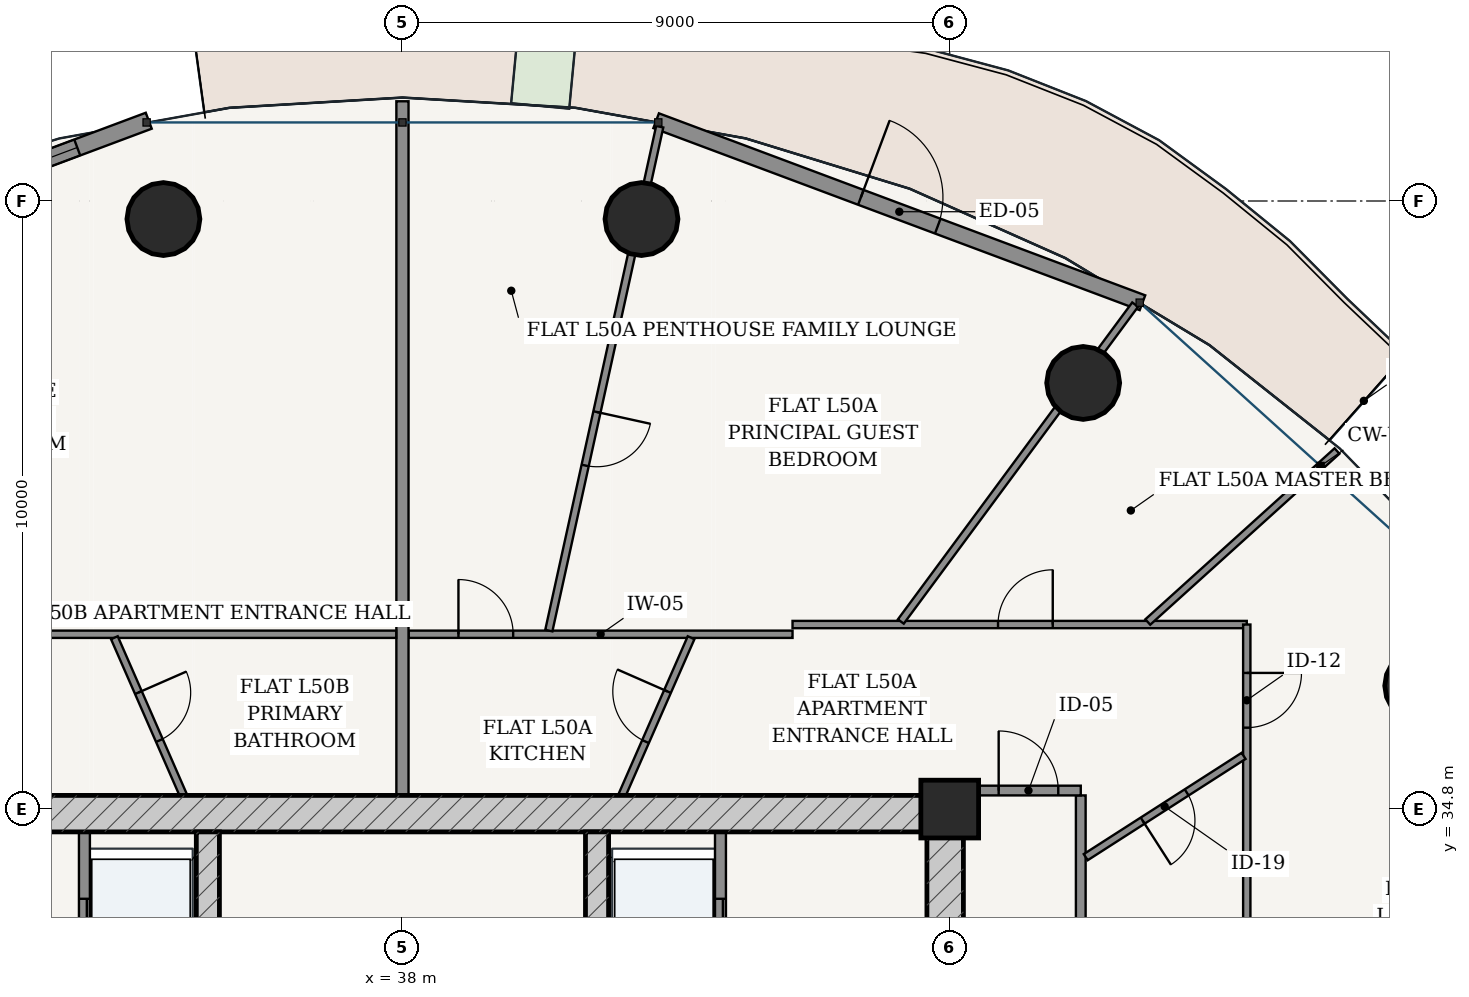
"""IFC4 building model, lengths in metres.
Left out: names, types, materials, properties, quantities, classifications, styles, units other than length and angle.
Written with IfcOpenShell. Run it as: python <this file> out.ifc"""

import sys

from ifc_helpers import new_model, si_unit, direction, frame, frame_2d, origin, origin_2d, place, context, subcontext, project, spatial, rectangle, hollow_circle, extrude, source, transform, mapped, element, fill, save


model = new_model("IFC4")
c1 = context("Model", 3, precision=1e-05, world=origin(), true_north=direction((-0.2419218956, 0.970295726276)))
c2 = subcontext(c1, "Body", "Model", "MODEL_VIEW")
j1 = project(units=[si_unit("LENGTHUNIT", "METRE"), si_unit("PLANEANGLEUNIT", "RADIAN")], contexts=[c1])
p1 = place(None, origin())
s1 = spatial("IfcSite", under=j1, at=p1, CompositionType="ELEMENT")
p2 = place(p1, origin())
s2 = spatial("IfcBuilding", under=s1, at=p2, CompositionType="ELEMENT")
p3 = place(p2, frame((0.0, 0.0, 191.2)))
s3 = spatial("IfcBuildingStorey", under=s2, at=p3, CompositionType="ELEMENT", Elevation=191.2)
p4 = place(p3, frame((47.0, 34.8, 0.0), z_axis=(0.0, 0.0, 1.0), x_axis=(1.0, 0.0, 0.0)))
e1 = element("IfcColumn", 1, at=p4, inside=s3, PredefinedType="COLUMN", context=c2, shape_type="SweptSolid", body=[
    extrude(rectangle(XDim=0.95, YDim=0.95, at=origin_2d()), origin(), (0.0, 0.0, 1.0), 3.7),
])
p5 = place(p3, frame((28.775, 34.725, 0.0), z_axis=(0.0, 0.0, 1.0), x_axis=(1.0, 0.0, 0.0)))
e2 = element("IfcWall", 2, at=p5, inside=s3, PredefinedType="SHEAR", context=c2, shape_type="SweptSolid", body=[
    extrude(rectangle(XDim=18.45, YDim=0.6, at=frame_2d((9.225, 0.0))), origin(), (0.0, 0.0, 1.0), 3.435),
])
p6 = place(p3, frame((46.925, 19.175, 0.0), z_axis=(0.0, 0.0, 1.0), x_axis=(0.0, 1.0, 0.0)))
e3 = element("IfcWall", 3, at=p6, inside=s3, PredefinedType="SHEAR", context=c2, shape_type="SweptSolid", body=[
    extrude(rectangle(XDim=15.25, YDim=0.6, at=frame_2d((7.625, 0.0))), origin(), (0.0, 0.0, 1.0), 3.435),
])
p7 = place(p6, frame((9.875, 0.0, 0.0)))
e4 = element("IfcOpeningElement", 4, at=p7, cuts=e3, PredefinedType="OPENING", context=c2, shape_type="SweptSolid", body=[
    extrude(rectangle(XDim=1.5, YDim=2.2, at=frame_2d((0.75, 1.1))), frame((0.0, 0.31, 0.0), z_axis=(0.0, -1.0, 0.0), x_axis=(1.0, 0.0, 0.0)), (0.0, 0.0, 1.0), 0.62),
])
p8 = place(p3, frame((34.8, 19.175, 0.0), z_axis=(0.0, 0.0, 1.0), x_axis=(0.0, 1.0, 0.0)))
e5 = element("IfcWall", 5, at=p8, inside=s3, PredefinedType="SHEAR", context=c2, shape_type="SweptSolid", body=[
    extrude(rectangle(XDim=15.25, YDim=0.38, at=frame_2d((7.625, 0.0))), origin(), (0.0, 0.0, 1.0), 3.435),
])
p9 = place(p8, frame((7.8, 0.0, 0.0)))
e6 = element("IfcOpeningElement", 6, at=p9, cuts=e5, PredefinedType="OPENING", context=c2, shape_type="SweptSolid", body=[
    extrude(rectangle(XDim=1.05, YDim=2.15, at=frame_2d((0.525, 1.075))), frame((0.0, 0.2, 0.0), z_axis=(0.0, -1.0, 0.0), x_axis=(1.0, 0.0, 0.0)), (0.0, 0.0, 1.0), 0.4),
])
p10 = place(p3, frame((41.2, 19.175, 0.0), z_axis=(0.0, 0.0, 1.0), x_axis=(0.0, 1.0, 0.0)))
e7 = element("IfcWall", 7, at=p10, inside=s3, PredefinedType="SHEAR", context=c2, shape_type="SweptSolid", body=[
    extrude(rectangle(XDim=15.25, YDim=0.38, at=frame_2d((7.625, 0.0))), origin(), (0.0, 0.0, 1.0), 3.435),
])
p11 = place(p10, frame((7.8, 0.0, 0.0)))
e8 = element("IfcOpeningElement", 8, at=p11, cuts=e7, PredefinedType="OPENING", context=c2, shape_type="SweptSolid", body=[
    extrude(rectangle(XDim=1.05, YDim=2.15, at=frame_2d((0.525, 1.075))), frame((0.0, 0.2, 0.0), z_axis=(0.0, -1.0, 0.0), x_axis=(1.0, 0.0, 0.0)), (0.0, 0.0, 1.0), 0.4),
])
for number, where, z_axis, x_axis in (
    (9, (54.754, 36.828, 0.0), (0.0, 0.0, 1.0), (1.0, 0.0, 0.0)),
    (10, (49.195, 41.808, 0.0), (0.0, 0.0, 1.0), (1.0, 0.0, 0.0)),
    (11, (41.931, 44.503, 0.0), (0.0, 0.0, 1.0), (1.0, 0.0, 0.0)),
    (12, (34.069, 44.503, 0.0), (0.0, 0.0, 1.0), (1.0, 0.0, 0.0)),
):
    element("IfcColumn", number, at=place(p3, frame(where, z_axis=z_axis, x_axis=x_axis)), inside=s3, PredefinedType="COLUMN", context=c2, shape_type="SweptSolid", body=[
        extrude(hollow_circle(Radius=0.6, WallThickness=0.038, at=origin_2d()), origin(), (0.0, 0.0, 1.0), 3.7),
    ])
p12 = place(p3, frame((50.17, 43.127, 0.0), z_axis=(0.0, 0.0, 1.0), x_axis=(-0.936556918375, 0.350515532672, 0.0)))
e13 = element("IfcWall", 13, at=p12, inside=s3, PredefinedType="SOLIDWALL", context=c2, shape_type="SweptSolid", body=[
    extrude(rectangle(XDim=8.539, YDim=0.26, at=frame_2d((4.27, 0.0))), origin(), (0.0, 0.0, 1.0), 3.435),
])
p13 = place(p12, frame((3.594, 0.0, 0.0)))
e14 = element("IfcOpeningElement", 14, at=p13, cuts=e13, PredefinedType="OPENING", context=c2, shape_type="SweptSolid", body=[
    extrude(rectangle(XDim=1.35, YDim=2.2, at=frame_2d((0.675, 1.1))), frame((0.0, 0.14, 0.0), z_axis=(0.0, -1.0, 0.0), x_axis=(1.0, 0.0, 0.0)), (0.0, 0.0, 1.0), 0.28),
])
p14 = place(p3, frame((33.828, 46.12, 0.0), z_axis=(0.0, 0.0, 1.0), x_axis=(-0.936556918375, -0.350515532672, 0.0)))
e15 = element("IfcWall", 15, at=p14, inside=s3, PredefinedType="SOLIDWALL", context=c2, shape_type="SweptSolid", body=[
    extrude(rectangle(XDim=8.539, YDim=0.28, at=frame_2d((4.27, 0.0))), origin(), (0.0, 0.0, 1.0), 3.435),
])
p15 = place(p14, frame((1.256, 0.0, 0.85)))
e16 = element("IfcOpeningElement", 16, at=p15, cuts=e15, PredefinedType="OPENING", context=c2, shape_type="SweptSolid", body=[
    extrude(rectangle(XDim=2.1, YDim=1.95, at=frame_2d((1.05, 0.975))), frame((0.0, 0.15, 0.0), z_axis=(0.0, -1.0, 0.0), x_axis=(1.0, 0.0, 0.0)), (0.0, 0.0, 1.0), 0.3),
])
p16 = place(p14, frame((5.184, 0.0, 0.85)))
e17 = element("IfcOpeningElement", 17, at=p16, cuts=e15, PredefinedType="OPENING", context=c2, shape_type="SweptSolid", body=[
    extrude(rectangle(XDim=2.1, YDim=1.95, at=frame_2d((1.05, 0.975))), frame((0.0, 0.15, 0.0), z_axis=(0.0, -1.0, 0.0), x_axis=(1.0, 0.0, 0.0)), (0.0, 0.0, 1.0), 0.3),
])
p17 = place(p3, frame((32.77, 28.52, 0.0), z_axis=(0.0, 0.0, 1.0), x_axis=(0.0, 1.0, 0.0)))
e18 = element("IfcWall", 18, at=p17, inside=s3, PredefinedType="PARTITIONING", context=c2, shape_type="SweptSolid", body=[
    extrude(rectangle(XDim=5.905, YDim=0.18, at=frame_2d((2.953, 0.0))), origin(), (0.0, 0.0, 1.0), 3.435),
])
p18 = place(p17, frame((3.655, 0.0, 0.0)))
e19 = element("IfcOpeningElement", 19, at=p18, cuts=e18, PredefinedType="OPENING", context=c2, shape_type="SweptSolid", body=[
    extrude(rectangle(XDim=1.15, YDim=2.2, at=frame_2d((0.575, 1.1))), frame((0.0, 0.1, 0.0), z_axis=(0.0, -1.0, 0.0), x_axis=(1.0, 0.0, 0.0)), (0.0, 0.0, 1.0), 0.2),
])
p19 = place(p17, frame((0.73, 0.0, 0.0)))
e20 = element("IfcOpeningElement", 20, at=p19, cuts=e18, PredefinedType="OPENING", context=c2, shape_type="SweptSolid", body=[
    extrude(rectangle(XDim=1.2, YDim=2.25, at=frame_2d((0.6, 1.125))), frame((0.0, 0.1, 0.0), z_axis=(0.0, -1.0, 0.0), x_axis=(1.0, 0.0, 0.0)), (0.0, 0.0, 1.0), 0.2),
])
p20 = place(p3, frame((43.23, 28.52, 0.0), z_axis=(0.0, 0.0, 1.0), x_axis=(0.0, 1.0, 0.0)))
e21 = element("IfcWall", 21, at=p20, inside=s3, PredefinedType="PARTITIONING", context=c2, shape_type="SweptSolid", body=[
    extrude(rectangle(XDim=5.905, YDim=0.18, at=frame_2d((2.953, 0.0))), origin(), (0.0, 0.0, 1.0), 3.435),
])
p21 = place(p20, frame((0.905, 0.0, 0.0)))
e22 = element("IfcOpeningElement", 22, at=p21, cuts=e21, PredefinedType="OPENING", context=c2, shape_type="SweptSolid", body=[
    extrude(rectangle(XDim=0.85, YDim=2.1, at=frame_2d((0.425, 1.05))), frame((0.0, 0.1, 0.0), z_axis=(0.0, -1.0, 0.0), x_axis=(1.0, 0.0, 0.0)), (0.0, 0.0, 1.0), 0.2),
])
p22 = place(p20, frame((3.655, 0.0, 0.0)))
e23 = element("IfcOpeningElement", 23, at=p22, cuts=e21, PredefinedType="OPENING", context=c2, shape_type="SweptSolid", body=[
    extrude(rectangle(XDim=1.15, YDim=2.2, at=frame_2d((0.575, 1.1))), frame((0.0, 0.1, 0.0), z_axis=(0.0, -1.0, 0.0), x_axis=(1.0, 0.0, 0.0)), (0.0, 0.0, 1.0), 0.2),
])
p23 = place(p3, frame((49.155, 16.725, 0.0), z_axis=(0.0, 0.0, 1.0), x_axis=(0.0, 1.0, 0.0)))
e24 = element("IfcWall", 24, at=p23, inside=s3, PredefinedType="PARTITIONING", context=c2, shape_type="SweptSolid", body=[
    extrude(rectangle(XDim=18.3, YDim=0.16, at=frame_2d((9.15, 0.0))), origin(), (0.0, 0.0, 1.0), 2.951),
])
p24 = place(p3, frame((47.225, 35.105, 0.0), z_axis=(0.0, 0.0, 1.0), x_axis=(1.0, 0.0, 0.0)))
e25 = element("IfcWall", 25, at=p24, inside=s3, PredefinedType="PARTITIONING", context=c2, shape_type="SweptSolid", body=[
    extrude(rectangle(XDim=1.93, YDim=0.16, at=frame_2d((0.965, 0.0))), origin(), (0.0, 0.0, 1.0), 3.435),
])
p25 = place(p24, frame((0.58, 0.0, 0.0)))
e26 = element("IfcOpeningElement", 26, at=p25, cuts=e25, PredefinedType="OPENING", context=c2, shape_type="SweptSolid", body=[
    extrude(rectangle(XDim=0.98, YDim=2.2, at=frame_2d((0.49, 1.1))), frame((0.0, 0.09, 0.0), z_axis=(0.0, -1.0, 0.0), x_axis=(1.0, 0.0, 0.0)), (0.0, 0.0, 1.0), 0.18),
])
p26 = place(p3, frame((38.102, 37.675, 0.0), z_axis=(0.0, 0.0, 1.0), x_axis=(1.0, 0.0, 0.0)))
e27 = element("IfcWall", 27, at=p26, inside=s3, PredefinedType="PARTITIONING", context=c2, shape_type="SweptSolid", body=[
    extrude(rectangle(XDim=6.313, YDim=0.12, at=frame_2d((3.156, 0.0))), origin(), (0.0, 0.0, 1.0), 2.951),
])
p27 = place(p26, frame((0.819, 0.0, 0.0)))
e28 = element("IfcOpeningElement", 28, at=p27, cuts=e27, PredefinedType="OPENING", context=c2, shape_type="SweptSolid", body=[
    extrude(rectangle(XDim=0.9, YDim=2.15, at=frame_2d((0.45, 1.075))), frame((0.0, 0.07, 0.0), z_axis=(0.0, -1.0, 0.0), x_axis=(1.0, 0.0, 0.0)), (0.0, 0.0, 1.0), 0.14),
])
p28 = place(p3, frame((44.415, 37.835, 0.0), z_axis=(0.0, 0.0, 1.0), x_axis=(1.0, 0.0, 0.0)))
e29 = element("IfcWall", 29, at=p28, inside=s3, PredefinedType="PARTITIONING", context=c2, shape_type="SweptSolid", body=[
    extrude(rectangle(XDim=7.47, YDim=0.12, at=frame_2d((3.735, 0.0))), origin(), (0.0, 0.0, 1.0), 2.951),
])
p29 = place(p28, frame((3.379, 0.0, 0.0)))
e30 = element("IfcOpeningElement", 30, at=p29, cuts=e29, PredefinedType="OPENING", context=c2, shape_type="SweptSolid", body=[
    extrude(rectangle(XDim=0.9, YDim=2.15, at=frame_2d((0.45, 1.075))), frame((0.0, 0.07, 0.0), z_axis=(0.0, -1.0, 0.0), x_axis=(1.0, 0.0, 0.0)), (0.0, 0.0, 1.0), 0.14),
])
p30 = place(p3, frame((51.885, 37.835, 0.0), z_axis=(0.0, 0.0, 1.0), x_axis=(0.0, -1.0, 0.0)))
e31 = element("IfcWall", 31, at=p30, inside=s3, PredefinedType="PARTITIONING", context=c2, shape_type="SweptSolid", body=[
    extrude(rectangle(XDim=8.437, YDim=0.12, at=frame_2d((4.219, 0.0))), origin(), (0.0, 0.0, 1.0), 2.951),
])
p31 = place(p30, frame((0.796, 0.0, 0.0)))
e32 = element("IfcOpeningElement", 32, at=p31, cuts=e31, PredefinedType="OPENING", context=c2, shape_type="SweptSolid", body=[
    extrude(rectangle(XDim=0.9, YDim=2.15, at=frame_2d((0.45, 1.075))), frame((0.0, 0.07, 0.0), z_axis=(0.0, -1.0, 0.0), x_axis=(1.0, 0.0, 0.0)), (0.0, 0.0, 1.0), 0.14),
])
p32 = place(p3, frame((50.257, 37.876, 0.0), z_axis=(0.0, 0.0, 1.0), x_axis=(0.741943837234, 0.670462036502, 0.0)))
e33 = element("IfcWall", 33, at=p32, inside=s3, PredefinedType="PARTITIONING", context=c2, shape_type="SweptSolid", body=[
    extrude(rectangle(XDim=4.194, YDim=0.12, at=frame_2d((2.097, 0.0))), origin(), (0.0, 0.0, 1.0), 2.951),
])
p33 = place(p3, frame((46.196, 37.885, 0.0), z_axis=(0.0, 0.0, 1.0), x_axis=(0.594507557292, 0.804090022524, 0.0)))
e34 = element("IfcWall", 34, at=p33, inside=s3, PredefinedType="PARTITIONING", context=c2, shape_type="SweptSolid", body=[
    extrude(rectangle(XDim=6.481, YDim=0.12, at=frame_2d((3.241, 0.0))), origin(), (0.0, 0.0, 1.0), 2.951),
])
p34 = place(p3, frame((40.407, 37.736, 0.0), z_axis=(0.0, 0.0, 1.0), x_axis=(0.214971015179, 0.97662042915, 0.0)))
e35 = element("IfcWall", 35, at=p34, inside=s3, PredefinedType="PARTITIONING", context=c2, shape_type="SweptSolid", body=[
    extrude(rectangle(XDim=8.485, YDim=0.12, at=frame_2d((4.242, 0.0))), origin(), (0.0, 0.0, 1.0), 2.951),
])
p35 = place(p34, frame((2.78, 0.0, 0.0)))
e36 = element("IfcOpeningElement", 36, at=p35, cuts=e35, PredefinedType="OPENING", context=c2, shape_type="SweptSolid", body=[
    extrude(rectangle(XDim=0.9, YDim=2.15, at=frame_2d((0.45, 1.075))), frame((0.0, 0.07, 0.0), z_axis=(0.0, -1.0, 0.0), x_axis=(1.0, 0.0, 0.0)), (0.0, 0.0, 1.0), 0.14),
])
p36 = place(p3, frame((49.237, 34.009, 0.0), z_axis=(0.0, 0.0, 1.0), x_axis=(0.841651322174, 0.540021343915, 0.0)))
e37 = element("IfcWall", 37, at=p36, inside=s3, PredefinedType="PARTITIONING", context=c2, shape_type="SweptSolid", body=[
    extrude(rectangle(XDim=3.085, YDim=0.12, at=frame_2d((1.542, 0.0))), origin(), (0.0, 0.0, 1.0), 3.11),
])
p37 = place(p36, frame((1.112, 0.0, 0.0)))
e38 = element("IfcOpeningElement", 38, at=p37, cuts=e37, PredefinedType="OPENING", context=c2, shape_type="SweptSolid", body=[
    extrude(rectangle(XDim=0.86, YDim=2.15, at=frame_2d((0.43, 1.075))), frame((0.0, 0.07, 0.0), z_axis=(0.0, -1.0, 0.0), x_axis=(1.0, 0.0, 0.0)), (0.0, 0.0, 1.0), 0.14),
])
p38 = place(p3, frame((41.61, 35.027, 0.0), z_axis=(0.0, 0.0, 1.0), x_axis=(0.401859508224, 0.915701335398, 0.0)))
e39 = element("IfcWall", 39, at=p38, inside=s3, PredefinedType="PARTITIONING", context=c2, shape_type="SweptSolid", body=[
    extrude(rectangle(XDim=2.83, YDim=0.12, at=frame_2d((1.415, 0.0))), origin(), (0.0, 0.0, 1.0), 3.435),
])
p39 = place(p38, frame((0.965, 0.0, 0.0)))
e40 = element("IfcOpeningElement", 40, at=p39, cuts=e39, PredefinedType="OPENING", context=c2, shape_type="SweptSolid", body=[
    extrude(rectangle(XDim=0.9, YDim=2.15, at=frame_2d((0.45, 1.075))), frame((0.0, 0.07, 0.0), z_axis=(0.0, -1.0, 0.0), x_axis=(1.0, 0.0, 0.0)), (0.0, 0.0, 1.0), 0.14),
])
p40 = place(p3, frame((38.0, 35.027, 0.0), z_axis=(0.0, 0.0, 1.0), x_axis=(0.0, 1.0, 0.0)))
e41 = element("IfcWall", 41, at=p40, inside=s3, PredefinedType="PARTITIONING", context=c2, shape_type="SweptSolid", body=[
    extrude(rectangle(XDim=11.413, YDim=0.2, at=frame_2d((5.707, 0.0))), origin(), (0.0, 0.0, 1.0), 2.52),
])
p41 = place(p3, frame((31.585, 37.675, 0.0), z_axis=(0.0, 0.0, 1.0), x_axis=(1.0, 0.0, 0.0)))
e42 = element("IfcWall", 42, at=p41, inside=s3, PredefinedType="PARTITIONING", context=c2, shape_type="SweptSolid", body=[
    extrude(rectangle(XDim=6.313, YDim=0.12, at=frame_2d((3.156, 0.0))), origin(), (0.0, 0.0, 1.0), 2.951),
])
p42 = place(p3, frame((34.397, 35.027, 0.0), z_axis=(0.0, 0.0, 1.0), x_axis=(-0.401135725485, 0.916018629581, 0.0)))
e43 = element("IfcWall", 43, at=p42, inside=s3, PredefinedType="PARTITIONING", context=c2, shape_type="SweptSolid", body=[
    extrude(rectangle(XDim=2.829, YDim=0.12, at=frame_2d((1.415, 0.0))), origin(), (0.0, 0.0, 1.0), 3.435),
])
p43 = place(p42, frame((0.985, 0.0, 0.0)))
e44 = element("IfcOpeningElement", 44, at=p43, cuts=e43, PredefinedType="OPENING", context=c2, shape_type="SweptSolid", body=[
    extrude(rectangle(XDim=0.86, YDim=2.15, at=frame_2d((0.43, 1.075))), frame((0.0, 0.07, 0.0), z_axis=(0.0, -1.0, 0.0), x_axis=(1.0, 0.0, 0.0)), (0.0, 0.0, 1.0), 0.14),
])
m1 = source(origin(), c2, "Body", "SweptSolid", [
    extrude(rectangle(XDim=1.35, YDim=2.2, at=frame_2d((0.675, 1.1))), frame((0.0, 0.025, 0.0), z_axis=(0.0, -1.0, 0.0), x_axis=(1.0, 0.0, 0.0)), (0.0, 0.0, 1.0), 0.05),
])
p44 = place(p13, frame((1.35, 0.0, 0.0), z_axis=(0.0, 0.0, 1.0), x_axis=(-1.0, 0.0, 0.0)))
e45 = element("IfcDoor", 45, at=p44, inside=s3, OperationType="SINGLE_SWING_LEFT", PredefinedType="DOOR", context=c2, shape_type="MappedRepresentation", body=[
    mapped(m1, transform((0.0, 0.0, 0.0), scale=1.0)),
])
fill(e14, e45)
m2 = source(origin(), c2, "Body", "SweptSolid", [
    extrude(rectangle(XDim=2.1, YDim=1.95, at=frame_2d((1.05, 0.975))), frame((0.0, 0.03, 0.0), z_axis=(0.0, -1.0, 0.0), x_axis=(1.0, 0.0, 0.0)), (0.0, 0.0, 1.0), 0.06),
])
p45 = place(p15, origin())
e46 = element("IfcWindow", 46, at=p45, inside=s3, PartitioningType="SINGLE_PANEL", PredefinedType="WINDOW", context=c2, shape_type="MappedRepresentation", body=[
    mapped(m2, transform((0.0, 0.0, 0.0), scale=1.0)),
])
fill(e16, e46)
m3 = source(origin(), c2, "Body", "SweptSolid", [
    extrude(rectangle(XDim=1.15, YDim=2.2, at=frame_2d((0.575, 1.1))), frame((0.0, 0.025, 0.0), z_axis=(0.0, -1.0, 0.0), x_axis=(1.0, 0.0, 0.0)), (0.0, 0.0, 1.0), 0.05),
])
p46 = place(p18, origin())
e47 = element("IfcDoor", 47, at=p46, inside=s3, OperationType="DOUBLE_DOOR_SLIDING", PredefinedType="DOOR", context=c2, shape_type="MappedRepresentation", body=[
    mapped(m3, transform((0.0, 0.0, 0.0), scale=1.0)),
])
fill(e19, e47)
p47 = place(p22, origin())
e48 = element("IfcDoor", 48, at=p47, inside=s3, OperationType="DOUBLE_DOOR_SLIDING", PredefinedType="DOOR", context=c2, shape_type="MappedRepresentation", body=[
    mapped(m3, transform((0.0, 0.0, 0.0), scale=1.0)),
])
fill(e23, e48)
m4 = source(origin(), c2, "Body", "SweptSolid", [
    extrude(rectangle(XDim=0.98, YDim=2.2, at=frame_2d((0.49, 1.1))), frame((0.0, 0.025, 0.0), z_axis=(0.0, -1.0, 0.0), x_axis=(1.0, 0.0, 0.0)), (0.0, 0.0, 1.0), 0.05),
])
p48 = place(p25, origin())
e49 = element("IfcDoor", 49, at=p48, inside=s3, OperationType="SINGLE_SWING_LEFT", PredefinedType="DOOR", context=c2, shape_type="MappedRepresentation", body=[
    mapped(m4, transform((0.0, 0.0, 0.0), scale=1.0)),
])
fill(e26, e49)
m5 = source(origin(), c2, "Body", "SweptSolid", [
    extrude(rectangle(XDim=0.86, YDim=2.15, at=frame_2d((0.43, 1.075))), frame((0.0, 0.025, 0.0), z_axis=(0.0, -1.0, 0.0), x_axis=(1.0, 0.0, 0.0)), (0.0, 0.0, 1.0), 0.05),
])
p49 = place(p37, frame((0.86, 0.0, 0.0), z_axis=(0.0, 0.0, 1.0), x_axis=(-1.0, 0.0, 0.0)))
e50 = element("IfcDoor", 50, at=p49, inside=s3, OperationType="SINGLE_SWING_RIGHT", PredefinedType="DOOR", context=c2, shape_type="MappedRepresentation", body=[
    mapped(m5, transform((0.0, 0.0, 0.0), scale=1.0)),
])
fill(e38, e50)
m6 = source(origin(), c2, "Body", "SweptSolid", [
    extrude(rectangle(XDim=0.9, YDim=2.15, at=frame_2d((0.45, 1.075))), frame((0.0, 0.025, 0.0), z_axis=(0.0, -1.0, 0.0), x_axis=(1.0, 0.0, 0.0)), (0.0, 0.0, 1.0), 0.05),
])
p50 = place(p31, origin())
e51 = element("IfcDoor", 51, at=p50, inside=s3, OperationType="SINGLE_SWING_LEFT", PredefinedType="DOOR", context=c2, shape_type="MappedRepresentation", body=[
    mapped(m6, transform((0.0, 0.0, 0.0), scale=1.0)),
])
fill(e32, e51)
p51 = place(p39, origin())
e52 = element("IfcDoor", 52, at=p51, inside=s3, OperationType="SINGLE_SWING_RIGHT", PredefinedType="DOOR", context=c2, shape_type="MappedRepresentation", body=[
    mapped(m6, transform((0.0, 0.0, 0.0), scale=1.0)),
])
fill(e40, e52)
p52 = place(p27, origin())
e53 = element("IfcDoor", 53, at=p52, inside=s3, OperationType="SINGLE_SWING_LEFT", PredefinedType="DOOR", context=c2, shape_type="MappedRepresentation", body=[
    mapped(m6, transform((0.0, 0.0, 0.0), scale=1.0)),
])
fill(e28, e53)
p53 = place(p29, origin())
e54 = element("IfcDoor", 54, at=p53, inside=s3, OperationType="SINGLE_SWING_RIGHT", PredefinedType="DOOR", context=c2, shape_type="MappedRepresentation", body=[
    mapped(m6, transform((0.0, 0.0, 0.0), scale=1.0)),
])
fill(e30, e54)
p54 = place(p35, frame((0.9, 0.0, 0.0), z_axis=(0.0, 0.0, 1.0), x_axis=(-1.0, 0.0, 0.0)))
e55 = element("IfcDoor", 55, at=p54, inside=s3, OperationType="SINGLE_SWING_LEFT", PredefinedType="DOOR", context=c2, shape_type="MappedRepresentation", body=[
    mapped(m6, transform((0.0, 0.0, 0.0), scale=1.0)),
])
fill(e36, e55)
p55 = place(p43, frame((0.86, 0.0, 0.0), z_axis=(0.0, 0.0, 1.0), x_axis=(-1.0, 0.0, 0.0)))
e56 = element("IfcDoor", 56, at=p55, inside=s3, OperationType="SINGLE_SWING_LEFT", PredefinedType="DOOR", context=c2, shape_type="MappedRepresentation", body=[
    mapped(m5, transform((0.0, 0.0, 0.0), scale=1.0)),
])
fill(e44, e56)
save(model, sys.argv[1])
